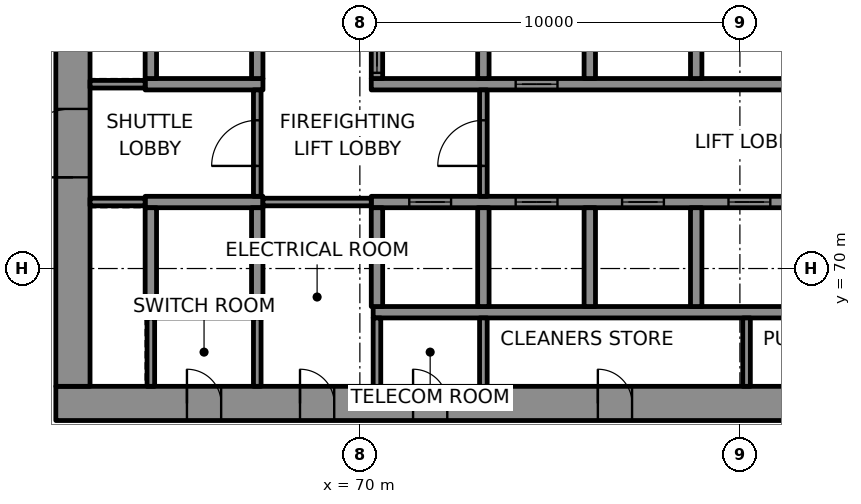
"""IFC4 building model, lengths in metres.
Left out: names, types, materials, properties, quantities, classifications, styles, units other than length and angle.
Written with IfcOpenShell. Run it as: python <this file> out.ifc"""

import sys

from ifc_helpers import new_model, si_unit, direction, frame, frame_2d, origin, place, context, subcontext, project, spatial, rectangle, extrude, element, fill, save


model = new_model("IFC4")
c1 = context("Model", 3, precision=1e-05, world=origin(), true_north=direction((0.0, 1.0)))
c2 = subcontext(c1, "Body", "Model", "MODEL_VIEW")
j1 = project(units=[si_unit("LENGTHUNIT", "METRE"), si_unit("PLANEANGLEUNIT", "RADIAN")], contexts=[c1])
p1 = place(None, origin())
s1 = spatial("IfcSite", under=j1, at=p1, CompositionType="ELEMENT")
p2 = place(p1, origin())
s2 = spatial("IfcBuilding", under=s1, at=p2, CompositionType="ELEMENT")
p3 = place(p2, frame((0.0, 0.0, 82.0)))
s3 = spatial("IfcBuildingStorey", under=s2, at=p3, CompositionType="ELEMENT", Elevation=82.0)
p4 = place(p3, frame((62.0, 66.45, 0.0), z_axis=(0.0, 0.0, 1.0), x_axis=(1.0, 0.0, 0.0)))
e1 = element("IfcWall", 1, at=p4, inside=s3, PredefinedType="SHEAR", context=c2, shape_type="SweptSolid", body=[
    extrude(rectangle(XDim=26.0, YDim=0.9, at=frame_2d((13.0, 0.0))), origin(), (0.0, 0.0, 1.0), 4.0),
])
p5 = place(p4, frame((3.45, 0.0, 0.0)))
e2 = element("IfcOpeningElement", 2, at=p5, cuts=e1, PredefinedType="OPENING", context=c2, shape_type="SweptSolid", body=[
    extrude(rectangle(XDim=0.9, YDim=2.1, at=frame_2d((0.45, 1.05))), frame((0.0, 0.46, 0.0), z_axis=(0.0, -1.0, 0.0), x_axis=(1.0, 0.0, 0.0)), (0.0, 0.0, 1.0), 0.92),
])
p6 = place(p4, frame((6.425, 0.0, 0.0)))
e3 = element("IfcOpeningElement", 3, at=p6, cuts=e1, PredefinedType="OPENING", context=c2, shape_type="SweptSolid", body=[
    extrude(rectangle(XDim=0.9, YDim=2.1, at=frame_2d((0.45, 1.05))), frame((0.0, 0.46, 0.0), z_axis=(0.0, -1.0, 0.0), x_axis=(1.0, 0.0, 0.0)), (0.0, 0.0, 1.0), 0.92),
])
p7 = place(p4, frame((9.4, 0.0, 0.0)))
e4 = element("IfcOpeningElement", 4, at=p7, cuts=e1, PredefinedType="OPENING", context=c2, shape_type="SweptSolid", body=[
    extrude(rectangle(XDim=0.9, YDim=2.1, at=frame_2d((0.45, 1.05))), frame((0.0, 0.46, 0.0), z_axis=(0.0, -1.0, 0.0), x_axis=(1.0, 0.0, 0.0)), (0.0, 0.0, 1.0), 0.92),
])
p8 = place(p4, frame((14.262, 0.0, 0.0)))
e5 = element("IfcOpeningElement", 5, at=p8, cuts=e1, PredefinedType="OPENING", context=c2, shape_type="SweptSolid", body=[
    extrude(rectangle(XDim=0.9, YDim=2.1, at=frame_2d((0.45, 1.05))), frame((0.0, 0.46, 0.0), z_axis=(0.0, -1.0, 0.0), x_axis=(1.0, 0.0, 0.0)), (0.0, 0.0, 1.0), 0.92),
])
p9 = place(p4, frame((21.188, 0.0, 0.0)))
e6 = element("IfcOpeningElement", 6, at=p9, cuts=e1, PredefinedType="OPENING", context=c2, shape_type="SweptSolid", body=[
    extrude(rectangle(XDim=0.9, YDim=2.1, at=frame_2d((0.45, 1.05))), frame((0.0, 0.46, 0.0), z_axis=(0.0, -1.0, 0.0), x_axis=(1.0, 0.0, 0.0)), (0.0, 0.0, 1.0), 0.92),
])
p10 = place(p3, frame((62.45, 66.9, 0.0), z_axis=(0.0, 0.0, 1.0), x_axis=(0.0, 1.0, 0.0)))
e7 = element("IfcWall", 7, at=p10, inside=s3, PredefinedType="SHEAR", context=c2, shape_type="SweptSolid", body=[
    extrude(rectangle(XDim=16.2, YDim=0.9, at=frame_2d((8.1, 0.0))), origin(), (0.0, 0.0, 1.0), 4.0),
])
p11 = place(p10, frame((5.5, 0.0, 0.0)))
e8 = element("IfcOpeningElement", 8, at=p11, cuts=e7, PredefinedType="OPENING", context=c2, shape_type="SweptSolid", body=[
    extrude(rectangle(XDim=1.8, YDim=2.1, at=frame_2d((0.9, 1.05))), frame((0.0, 0.46, 0.0), z_axis=(0.0, -1.0, 0.0), x_axis=(1.0, 0.0, 0.0)), (0.0, 0.0, 1.0), 0.92),
])
p12 = place(p3, frame((64.35, 68.85, 0.0), z_axis=(0.0, 0.0, 1.0), x_axis=(1.0, 0.0, 0.0)))
e9 = element("IfcWall", 9, at=p12, inside=s3, PredefinedType="SHEAR", context=c2, shape_type="SweptSolid", body=[
    extrude(rectangle(XDim=3.1, YDim=0.3, at=frame_2d((1.55, 0.0))), origin(), (0.0, 0.0, 1.0), 4.0),
])
p13 = place(p3, frame((70.35, 68.85, 0.0), z_axis=(0.0, 0.0, 1.0), x_axis=(1.0, 0.0, 0.0)))
e10 = element("IfcWall", 10, at=p13, inside=s3, PredefinedType="SHEAR", context=c2, shape_type="SweptSolid", body=[
    extrude(rectangle(XDim=16.75, YDim=0.3, at=frame_2d((8.375, 0.0))), origin(), (0.0, 0.0, 1.0), 4.0),
])
p14 = place(p3, frame((64.35, 71.75, 0.0), z_axis=(0.0, 0.0, 1.0), x_axis=(1.0, 0.0, 0.0)))
e11 = element("IfcWall", 11, at=p14, inside=s3, PredefinedType="SHEAR", context=c2, shape_type="SweptSolid", body=[
    extrude(rectangle(XDim=3.1, YDim=0.3, at=frame_2d((1.55, 0.0))), origin(), (0.0, 0.0, 1.0), 4.0),
])
p15 = place(p3, frame((70.3, 71.75, 0.0), z_axis=(0.0, 0.0, 1.0), x_axis=(1.0, 0.0, 0.0)))
e12 = element("IfcWall", 12, at=p15, inside=s3, PredefinedType="SHEAR", context=c2, shape_type="SweptSolid", body=[
    extrude(rectangle(XDim=16.8, YDim=0.3, at=frame_2d((8.4, 0.0))), origin(), (0.0, 0.0, 1.0), 4.0),
])
p16 = place(p15, frame((1.0, 0.0, 0.0)))
e13 = element("IfcOpeningElement", 13, at=p16, cuts=e12, PredefinedType="OPENING", context=c2, shape_type="SweptSolid", body=[
    extrude(rectangle(XDim=1.1, YDim=2.1, at=frame_2d((0.55, 1.05))), frame((0.0, 0.16, 0.0), z_axis=(0.0, -1.0, 0.0), x_axis=(1.0, 0.0, 0.0)), (0.0, 0.0, 1.0), 0.32),
])
p17 = place(p15, frame((3.8, 0.0, 0.0)))
e14 = element("IfcOpeningElement", 14, at=p17, cuts=e12, PredefinedType="OPENING", context=c2, shape_type="SweptSolid", body=[
    extrude(rectangle(XDim=1.1, YDim=2.1, at=frame_2d((0.55, 1.05))), frame((0.0, 0.16, 0.0), z_axis=(0.0, -1.0, 0.0), x_axis=(1.0, 0.0, 0.0)), (0.0, 0.0, 1.0), 0.32),
])
p18 = place(p15, frame((6.6, 0.0, 0.0)))
e15 = element("IfcOpeningElement", 15, at=p18, cuts=e12, PredefinedType="OPENING", context=c2, shape_type="SweptSolid", body=[
    extrude(rectangle(XDim=1.1, YDim=2.1, at=frame_2d((0.55, 1.05))), frame((0.0, 0.16, 0.0), z_axis=(0.0, -1.0, 0.0), x_axis=(1.0, 0.0, 0.0)), (0.0, 0.0, 1.0), 0.32),
])
p19 = place(p15, frame((9.4, 0.0, 0.0)))
e16 = element("IfcOpeningElement", 16, at=p19, cuts=e12, PredefinedType="OPENING", context=c2, shape_type="SweptSolid", body=[
    extrude(rectangle(XDim=1.1, YDim=2.1, at=frame_2d((0.55, 1.05))), frame((0.0, 0.16, 0.0), z_axis=(0.0, -1.0, 0.0), x_axis=(1.0, 0.0, 0.0)), (0.0, 0.0, 1.0), 0.32),
])
p20 = place(p15, frame((12.2, 0.0, 0.0)))
e17 = element("IfcOpeningElement", 17, at=p20, cuts=e12, PredefinedType="OPENING", context=c2, shape_type="SweptSolid", body=[
    extrude(rectangle(XDim=1.1, YDim=2.1, at=frame_2d((0.55, 1.05))), frame((0.0, 0.16, 0.0), z_axis=(0.0, -1.0, 0.0), x_axis=(1.0, 0.0, 0.0)), (0.0, 0.0, 1.0), 0.32),
])
p21 = place(p15, frame((14.925, 0.0, 0.0)))
e18 = element("IfcOpeningElement", 18, at=p21, cuts=e12, PredefinedType="OPENING", context=c2, shape_type="SweptSolid", body=[
    extrude(rectangle(XDim=1.1, YDim=2.1, at=frame_2d((0.55, 1.05))), frame((0.0, 0.16, 0.0), z_axis=(0.0, -1.0, 0.0), x_axis=(1.0, 0.0, 0.0)), (0.0, 0.0, 1.0), 0.32),
])
p22 = place(p3, frame((64.35, 74.85, 0.0), z_axis=(0.0, 0.0, 1.0), x_axis=(1.0, 0.0, 0.0)))
e19 = element("IfcWall", 19, at=p22, inside=s3, PredefinedType="SHEAR", context=c2, shape_type="SweptSolid", body=[
    extrude(rectangle(XDim=3.1, YDim=0.3, at=frame_2d((1.55, 0.0))), origin(), (0.0, 0.0, 1.0), 4.0),
])
p23 = place(p3, frame((70.3, 74.85, 0.0), z_axis=(0.0, 0.0, 1.0), x_axis=(1.0, 0.0, 0.0)))
e20 = element("IfcWall", 20, at=p23, inside=s3, PredefinedType="SHEAR", context=c2, shape_type="SweptSolid", body=[
    extrude(rectangle(XDim=16.8, YDim=0.3, at=frame_2d((8.4, 0.0))), origin(), (0.0, 0.0, 1.0), 4.0),
])
p24 = place(p23, frame((3.8, 0.0, 0.0)))
e21 = element("IfcOpeningElement", 21, at=p24, cuts=e20, PredefinedType="OPENING", context=c2, shape_type="SweptSolid", body=[
    extrude(rectangle(XDim=1.1, YDim=2.1, at=frame_2d((0.55, 1.05))), frame((0.0, 0.16, 0.0), z_axis=(0.0, -1.0, 0.0), x_axis=(1.0, 0.0, 0.0)), (0.0, 0.0, 1.0), 0.32),
])
p25 = place(p23, frame((12.2, 0.0, 0.0)))
e22 = element("IfcOpeningElement", 22, at=p25, cuts=e20, PredefinedType="OPENING", context=c2, shape_type="SweptSolid", body=[
    extrude(rectangle(XDim=1.1, YDim=2.1, at=frame_2d((0.55, 1.05))), frame((0.0, 0.16, 0.0), z_axis=(0.0, -1.0, 0.0), x_axis=(1.0, 0.0, 0.0)), (0.0, 0.0, 1.0), 0.32),
])
p26 = place(p23, frame((14.925, 0.0, 0.0)))
e23 = element("IfcOpeningElement", 23, at=p26, cuts=e20, PredefinedType="OPENING", context=c2, shape_type="SweptSolid", body=[
    extrude(rectangle(XDim=1.1, YDim=2.1, at=frame_2d((0.55, 1.05))), frame((0.0, 0.16, 0.0), z_axis=(0.0, -1.0, 0.0), x_axis=(1.0, 0.0, 0.0)), (0.0, 0.0, 1.0), 0.32),
])
for number, where, z_axis, x_axis in (
    (24, (64.5, 69.0, 0.0), (0.0, 0.0, 1.0), (0.0, 1.0, 0.0)),
    (25, (64.5, 75.0, 0.0), (0.0, 0.0, 1.0), (0.0, 1.0, 0.0)),
    (26, (67.3, 69.0, 0.0), (0.0, 0.0, 1.0), (0.0, 1.0, 0.0)),
    (27, (67.3, 75.0, 0.0), (0.0, 0.0, 1.0), (0.0, 1.0, 0.0)),
    (28, (70.45, 69.0, 0.0), (0.0, 0.0, 1.0), (0.0, 1.0, 0.0)),
):
    element("IfcWall", number, at=place(p3, frame(where, z_axis=z_axis, x_axis=x_axis)), inside=s3, PredefinedType="SHEAR", context=c2, shape_type="SweptSolid", body=[
        extrude(rectangle(XDim=2.6, YDim=0.3, at=frame_2d((1.3, 0.0))), origin(), (0.0, 0.0, 1.0), 4.0),
    ])
p27 = place(p3, frame((70.45, 75.0, 0.0), z_axis=(0.0, 0.0, 1.0), x_axis=(0.0, 1.0, 0.0)))
e29 = element("IfcWall", 29, at=p27, inside=s3, PredefinedType="SHEAR", context=c2, shape_type="SweptSolid", body=[
    extrude(rectangle(XDim=2.6, YDim=0.3, at=frame_2d((1.3, 0.0))), origin(), (0.0, 0.0, 1.0), 4.0),
])
p28 = place(p27, frame((0.15, 0.0, 0.0)))
e30 = element("IfcOpeningElement", 30, at=p28, cuts=e29, PredefinedType="OPENING", context=c2, shape_type="SweptSolid", body=[
    extrude(rectangle(XDim=1.1, YDim=2.1, at=frame_2d((0.55, 1.05))), frame((0.0, 0.16, 0.0), z_axis=(0.0, -1.0, 0.0), x_axis=(1.0, 0.0, 0.0)), (0.0, 0.0, 1.0), 0.32),
])
for number, where, z_axis, x_axis in (
    (31, (73.25, 69.0, 0.0), (0.0, 0.0, 1.0), (0.0, 1.0, 0.0)),
    (32, (73.25, 75.0, 0.0), (0.0, 0.0, 1.0), (0.0, 1.0, 0.0)),
    (33, (76.05, 69.0, 0.0), (0.0, 0.0, 1.0), (0.0, 1.0, 0.0)),
    (34, (76.05, 75.0, 0.0), (0.0, 0.0, 1.0), (0.0, 1.0, 0.0)),
    (35, (78.85, 69.0, 0.0), (0.0, 0.0, 1.0), (0.0, 1.0, 0.0)),
    (36, (78.85, 75.0, 0.0), (0.0, 0.0, 1.0), (0.0, 1.0, 0.0)),
):
    element("IfcWall", number, at=place(p3, frame(where, z_axis=z_axis, x_axis=x_axis)), inside=s3, PredefinedType="SHEAR", context=c2, shape_type="SweptSolid", body=[
        extrude(rectangle(XDim=2.6, YDim=0.3, at=frame_2d((1.3, 0.0))), origin(), (0.0, 0.0, 1.0), 4.0),
    ])
p29 = place(p3, frame((110.601, 61.239, 0.0), z_axis=(0.0, 0.0, 1.0), x_axis=(-0.499998492585, 0.866026274089, 0.0)))
e37 = element("IfcWall", 37, at=p29, inside=s3, PredefinedType="SOLIDWALL", context=c2, shape_type="SweptSolid", body=[
    extrude(rectangle(XDim=59.436, YDim=0.8, at=frame_2d((29.718, 0.0))), origin(), (0.0, 0.0, 1.0), 0.9),
])
p30 = place(p3, frame((62.9, 71.75, 0.0), z_axis=(0.0, 0.0, 1.0), x_axis=(1.0, 0.0, 0.0)))
e38 = element("IfcWall", 38, at=p30, inside=s3, PredefinedType="PARTITIONING", context=c2, shape_type="SweptSolid", body=[
    extrude(rectangle(XDim=1.45, YDim=0.2, at=frame_2d((0.725, 0.0))), origin(), (0.0, 0.0, 1.0), 4.0),
])
p31 = place(p3, frame((67.45, 71.75, 0.0), z_axis=(0.0, 0.0, 1.0), x_axis=(1.0, 0.0, 0.0)))
e39 = element("IfcWall", 39, at=p31, inside=s3, PredefinedType="PARTITIONING", context=c2, shape_type="SweptSolid", body=[
    extrude(rectangle(XDim=2.85, YDim=0.2, at=frame_2d((1.425, 0.0))), origin(), (0.0, 0.0, 1.0), 4.0),
])
p32 = place(p3, frame((62.9, 74.85, 0.0), z_axis=(0.0, 0.0, 1.0), x_axis=(1.0, 0.0, 0.0)))
e40 = element("IfcWall", 40, at=p32, inside=s3, PredefinedType="PARTITIONING", context=c2, shape_type="SweptSolid", body=[
    extrude(rectangle(XDim=1.45, YDim=0.2, at=frame_2d((0.725, 0.0))), origin(), (0.0, 0.0, 1.0), 4.0),
])
for number, where, z_axis, x_axis in (
    (41, (64.5, 66.9, 0.0), (0.0, 0.0, 1.0), (0.0, 1.0, 0.0)),
    (42, (67.3, 66.9, 0.0), (0.0, 0.0, 1.0), (0.0, 1.0, 0.0)),
):
    element("IfcWall", number, at=place(p3, frame(where, z_axis=z_axis, x_axis=x_axis)), inside=s3, PredefinedType="PARTITIONING", context=c2, shape_type="SweptSolid", body=[
        extrude(rectangle(XDim=1.8, YDim=0.2, at=frame_2d((0.9, 0.0))), origin(), (0.0, 0.0, 1.0), 4.0),
    ])
p33 = place(p3, frame((67.3, 71.9, 0.0), z_axis=(0.0, 0.0, 1.0), x_axis=(0.0, 1.0, 0.0)))
e43 = element("IfcWall", 43, at=p33, inside=s3, PredefinedType="PARTITIONING", context=c2, shape_type="SweptSolid", body=[
    extrude(rectangle(XDim=2.8, YDim=0.2, at=frame_2d((1.4, 0.0))), origin(), (0.0, 0.0, 1.0), 4.0),
])
p34 = place(p33, frame((0.8, 0.0, 0.0)))
e44 = element("IfcOpeningElement", 44, at=p34, cuts=e43, PredefinedType="OPENING", context=c2, shape_type="SweptSolid", body=[
    extrude(rectangle(XDim=1.2, YDim=2.1, at=frame_2d((0.6, 1.05))), frame((0.0, 0.11, 0.0), z_axis=(0.0, -1.0, 0.0), x_axis=(1.0, 0.0, 0.0)), (0.0, 0.0, 1.0), 0.22),
])
for number, where, z_axis, x_axis in (
    (45, (70.45, 66.9, 0.0), (0.0, 0.0, 1.0), (0.0, 1.0, 0.0)),
    (46, (73.25, 66.9, 0.0), (0.0, 0.0, 1.0), (0.0, 1.0, 0.0)),
):
    element("IfcWall", number, at=place(p3, frame(where, z_axis=z_axis, x_axis=x_axis)), inside=s3, PredefinedType="PARTITIONING", context=c2, shape_type="SweptSolid", body=[
        extrude(rectangle(XDim=1.8, YDim=0.2, at=frame_2d((0.9, 0.0))), origin(), (0.0, 0.0, 1.0), 4.0),
    ])
p35 = place(p3, frame((73.25, 71.9, 0.0), z_axis=(0.0, 0.0, 1.0), x_axis=(0.0, 1.0, 0.0)))
e47 = element("IfcWall", 47, at=p35, inside=s3, PredefinedType="PARTITIONING", context=c2, shape_type="SweptSolid", body=[
    extrude(rectangle(XDim=2.8, YDim=0.2, at=frame_2d((1.4, 0.0))), origin(), (0.0, 0.0, 1.0), 4.0),
])
p36 = place(p35, frame((0.8, 0.0, 0.0)))
e48 = element("IfcOpeningElement", 48, at=p36, cuts=e47, PredefinedType="OPENING", context=c2, shape_type="SweptSolid", body=[
    extrude(rectangle(XDim=1.2, YDim=2.1, at=frame_2d((0.6, 1.05))), frame((0.0, 0.11, 0.0), z_axis=(0.0, -1.0, 0.0), x_axis=(1.0, 0.0, 0.0)), (0.0, 0.0, 1.0), 0.22),
])
p37 = place(p3, frame((80.175, 66.9, 0.0), z_axis=(0.0, 0.0, 1.0), x_axis=(0.0, 1.0, 0.0)))
e49 = element("IfcWall", 49, at=p37, inside=s3, PredefinedType="PARTITIONING", context=c2, shape_type="SweptSolid", body=[
    extrude(rectangle(XDim=1.8, YDim=0.2, at=frame_2d((0.9, 0.0))), origin(), (0.0, 0.0, 1.0), 4.0),
])
p38 = place(p16, origin())
e50 = element("IfcDoor", 50, at=p38, inside=s3, OperationType="DOUBLE_DOOR_SLIDING", PredefinedType="DOOR", context=c2, shape_type="SweptSolid", body=[
    extrude(rectangle(XDim=1.1, YDim=2.1, at=frame_2d((0.55, 1.05))), frame((0.0, 0.025, 0.0), z_axis=(0.0, -1.0, 0.0), x_axis=(1.0, 0.0, 0.0)), (0.0, 0.0, 1.0), 0.05),
])
fill(e13, e50)
p39 = place(p17, origin())
e51 = element("IfcDoor", 51, at=p39, inside=s3, OperationType="DOUBLE_DOOR_SLIDING", PredefinedType="DOOR", context=c2, shape_type="SweptSolid", body=[
    extrude(rectangle(XDim=1.1, YDim=2.1, at=frame_2d((0.55, 1.05))), frame((0.0, 0.025, 0.0), z_axis=(0.0, -1.0, 0.0), x_axis=(1.0, 0.0, 0.0)), (0.0, 0.0, 1.0), 0.05),
])
fill(e14, e51)
p40 = place(p18, origin())
e52 = element("IfcDoor", 52, at=p40, inside=s3, OperationType="DOUBLE_DOOR_SLIDING", PredefinedType="DOOR", context=c2, shape_type="SweptSolid", body=[
    extrude(rectangle(XDim=1.1, YDim=2.1, at=frame_2d((0.55, 1.05))), frame((0.0, 0.025, 0.0), z_axis=(0.0, -1.0, 0.0), x_axis=(1.0, 0.0, 0.0)), (0.0, 0.0, 1.0), 0.05),
])
fill(e15, e52)
p41 = place(p19, origin())
e53 = element("IfcDoor", 53, at=p41, inside=s3, OperationType="DOUBLE_DOOR_SLIDING", PredefinedType="DOOR", context=c2, shape_type="SweptSolid", body=[
    extrude(rectangle(XDim=1.1, YDim=2.1, at=frame_2d((0.55, 1.05))), frame((0.0, 0.025, 0.0), z_axis=(0.0, -1.0, 0.0), x_axis=(1.0, 0.0, 0.0)), (0.0, 0.0, 1.0), 0.05),
])
fill(e16, e53)
p42 = place(p28, origin())
e54 = element("IfcDoor", 54, at=p42, inside=s3, OperationType="DOUBLE_DOOR_SLIDING", PredefinedType="DOOR", context=c2, shape_type="SweptSolid", body=[
    extrude(rectangle(XDim=1.1, YDim=2.1, at=frame_2d((0.55, 1.05))), frame((0.0, 0.025, 0.0), z_axis=(0.0, -1.0, 0.0), x_axis=(1.0, 0.0, 0.0)), (0.0, 0.0, 1.0), 0.05),
])
fill(e30, e54)
p43 = place(p24, origin())
e55 = element("IfcDoor", 55, at=p43, inside=s3, OperationType="DOUBLE_DOOR_SLIDING", PredefinedType="DOOR", context=c2, shape_type="SweptSolid", body=[
    extrude(rectangle(XDim=1.1, YDim=2.1, at=frame_2d((0.55, 1.05))), frame((0.0, 0.025, 0.0), z_axis=(0.0, -1.0, 0.0), x_axis=(1.0, 0.0, 0.0)), (0.0, 0.0, 1.0), 0.05),
])
fill(e21, e55)
p44 = place(p36, origin())
e56 = element("IfcDoor", 56, at=p44, inside=s3, OperationType="SINGLE_SWING_LEFT", PredefinedType="DOOR", context=c2, shape_type="SweptSolid", body=[
    extrude(rectangle(XDim=1.2, YDim=2.1, at=frame_2d((0.6, 1.05))), frame((0.0, 0.025, 0.0), z_axis=(0.0, -1.0, 0.0), x_axis=(1.0, 0.0, 0.0)), (0.0, 0.0, 1.0), 0.05),
])
fill(e48, e56)
p45 = place(p34, origin())
e57 = element("IfcDoor", 57, at=p45, inside=s3, OperationType="SINGLE_SWING_RIGHT", PredefinedType="DOOR", context=c2, shape_type="SweptSolid", body=[
    extrude(rectangle(XDim=1.2, YDim=2.1, at=frame_2d((0.6, 1.05))), frame((0.0, 0.025, 0.0), z_axis=(0.0, -1.0, 0.0), x_axis=(1.0, 0.0, 0.0)), (0.0, 0.0, 1.0), 0.05),
])
fill(e44, e57)
p46 = place(p11, origin())
e58 = element("IfcDoor", 58, at=p46, inside=s3, OperationType="SINGLE_SWING_LEFT", PredefinedType="DOOR", context=c2, shape_type="SweptSolid", body=[
    extrude(rectangle(XDim=1.8, YDim=2.1, at=frame_2d((0.9, 1.05))), frame((0.0, 0.17, 0.0), z_axis=(0.0, -1.0, 0.0), x_axis=(1.0, 0.0, 0.0)), (0.0, 0.0, 1.0), 0.34),
])
fill(e8, e58)
p47 = place(p5, origin())
e59 = element("IfcDoor", 59, at=p47, inside=s3, OperationType="SINGLE_SWING_LEFT", PredefinedType="DOOR", context=c2, shape_type="SweptSolid", body=[
    extrude(rectangle(XDim=0.9, YDim=2.1, at=frame_2d((0.45, 1.05))), frame((0.0, 0.17, 0.0), z_axis=(0.0, -1.0, 0.0), x_axis=(1.0, 0.0, 0.0)), (0.0, 0.0, 1.0), 0.34),
])
fill(e2, e59)
p48 = place(p6, origin())
e60 = element("IfcDoor", 60, at=p48, inside=s3, OperationType="SINGLE_SWING_RIGHT", PredefinedType="DOOR", context=c2, shape_type="SweptSolid", body=[
    extrude(rectangle(XDim=0.9, YDim=2.1, at=frame_2d((0.45, 1.05))), frame((0.0, 0.17, 0.0), z_axis=(0.0, -1.0, 0.0), x_axis=(1.0, 0.0, 0.0)), (0.0, 0.0, 1.0), 0.34),
])
fill(e3, e60)
p49 = place(p7, origin())
e61 = element("IfcDoor", 61, at=p49, inside=s3, OperationType="SINGLE_SWING_LEFT", PredefinedType="DOOR", context=c2, shape_type="SweptSolid", body=[
    extrude(rectangle(XDim=0.9, YDim=2.1, at=frame_2d((0.45, 1.05))), frame((0.0, 0.17, 0.0), z_axis=(0.0, -1.0, 0.0), x_axis=(1.0, 0.0, 0.0)), (0.0, 0.0, 1.0), 0.34),
])
fill(e4, e61)
p50 = place(p8, origin())
e62 = element("IfcDoor", 62, at=p50, inside=s3, OperationType="SINGLE_SWING_RIGHT", PredefinedType="DOOR", context=c2, shape_type="SweptSolid", body=[
    extrude(rectangle(XDim=0.9, YDim=2.1, at=frame_2d((0.45, 1.05))), frame((0.0, 0.17, 0.0), z_axis=(0.0, -1.0, 0.0), x_axis=(1.0, 0.0, 0.0)), (0.0, 0.0, 1.0), 0.34),
])
fill(e5, e62)
save(model, sys.argv[1])
